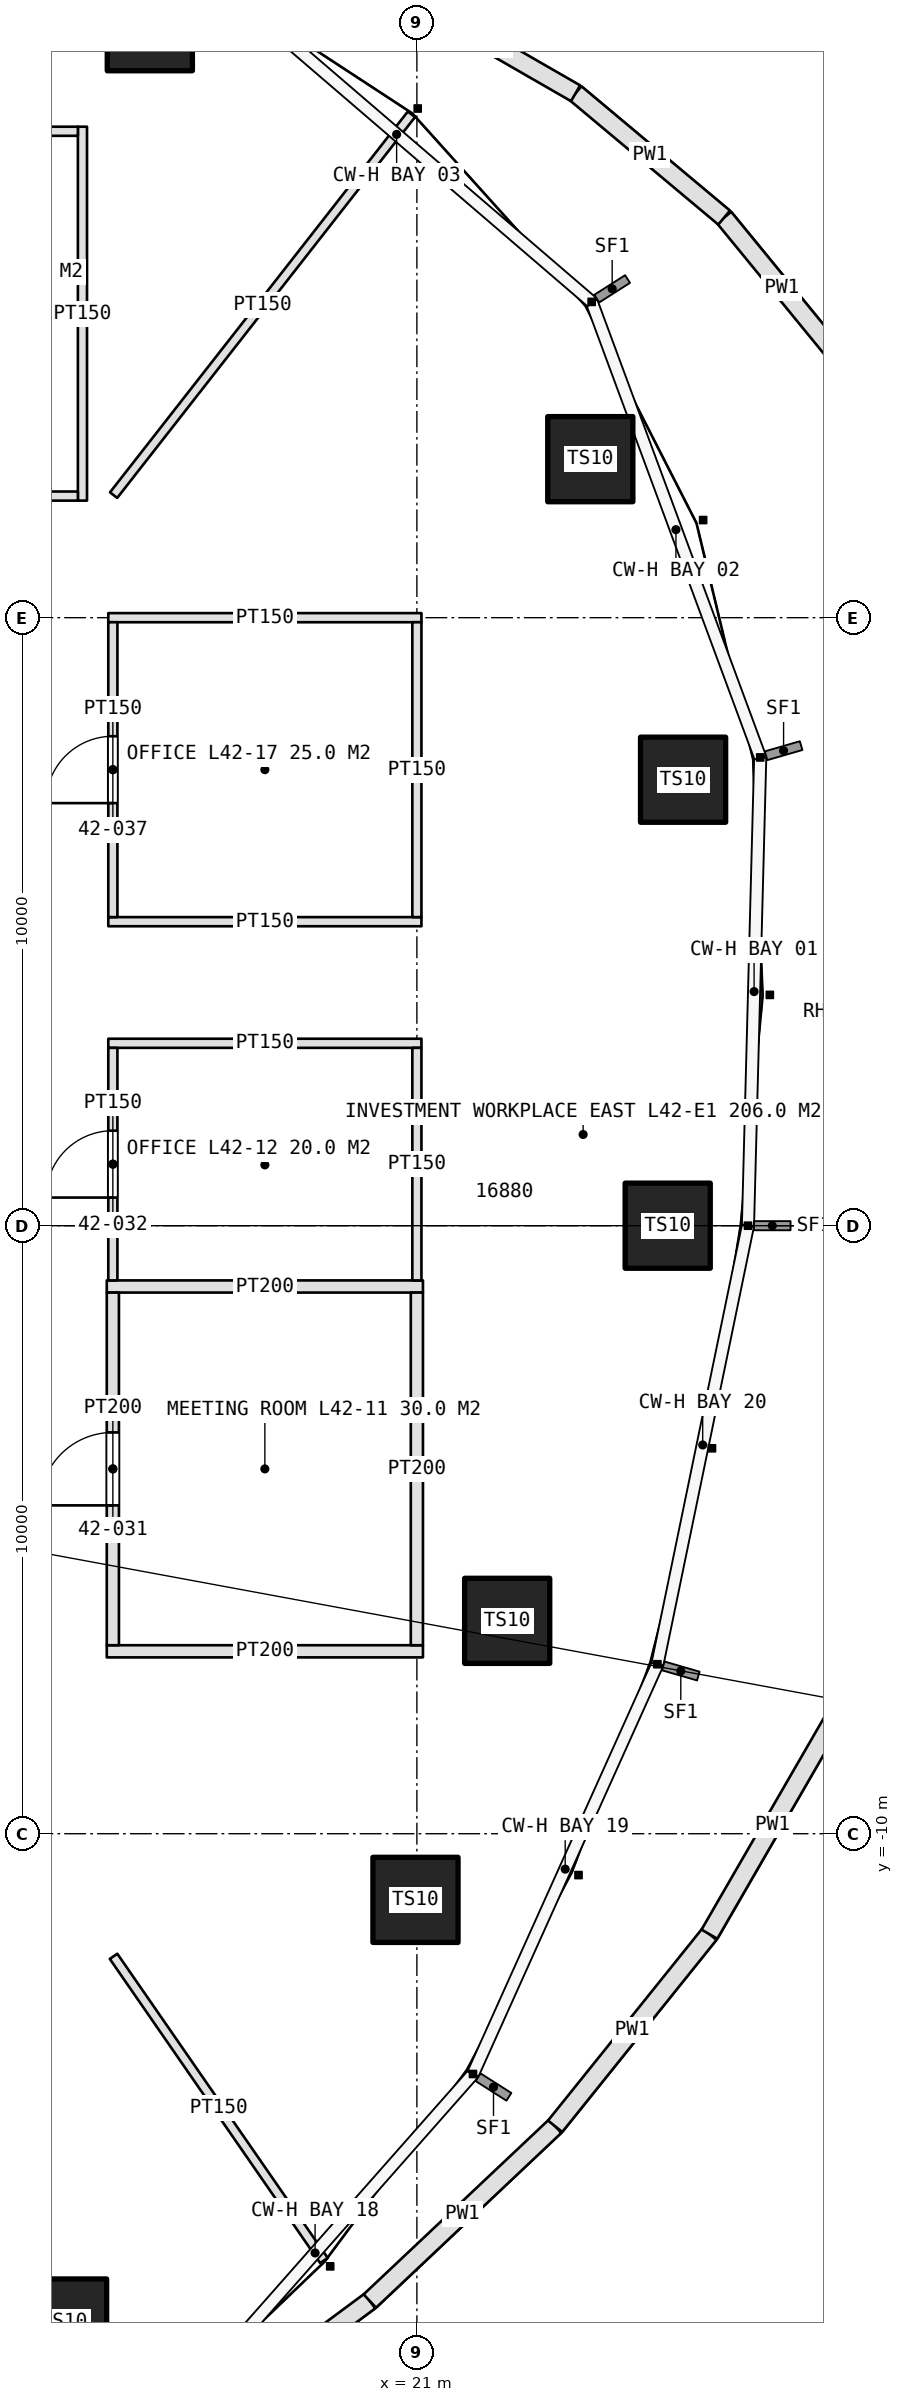
"""IFC4 building model, lengths in metres.
Left out: names, types, materials, properties, quantities, classifications, styles, units other than length and angle.
Written with IfcOpenShell. Run it as: python <this file> out.ifc"""

import sys

from ifc_helpers import new_model, si_unit, direction, frame, frame_2d, origin, origin_2d, place, context, subcontext, project, spatial, rectangle, hollow_rectangle, extrude, element, fill, save


model = new_model("IFC4")
c1 = context("Model", 3, precision=1e-05, world=origin(), true_north=direction((0.0, 1.0)))
c2 = subcontext(c1, "Body", "Model", "MODEL_VIEW")
j1 = project(units=[si_unit("LENGTHUNIT", "METRE"), si_unit("PLANEANGLEUNIT", "RADIAN")], contexts=[c1])
p1 = place(None, origin())
s1 = spatial("IfcSite", under=j1, at=p1, CompositionType="ELEMENT")
p2 = place(p1, origin())
s2 = spatial("IfcBuilding", under=s1, at=p2, CompositionType="ELEMENT")
p3 = place(p2, frame((0.0, 0.0, 194.8)))
s3 = spatial("IfcBuildingStorey", under=s2, at=p3, CompositionType="ELEMENT", Elevation=194.8)
for number, where, z_axis, x_axis in (
    (1, (25.125, 0.0, 0.775), (0.0, 0.0, 1.0), (1.0, 0.0, 0.0)),
    (2, (25.378, 7.335, 0.775), (0.0, 0.0, 1.0), (1.0, 0.0, 0.0)),
    (3, (23.852, 12.607, 0.775), (0.0, 0.0, 1.0), (1.0, 0.0, 0.0)),
):
    element("IfcColumn", number, at=place(p3, frame(where, z_axis=z_axis, x_axis=x_axis)), inside=s3, PredefinedType="COLUMN", context=c2, shape_type="SweptSolid", body=[
        extrude(hollow_rectangle(XDim=1.4, YDim=1.4, WallThickness=0.15, at=origin_2d()), origin(), (0.0, 0.0, 1.0), 3.425),
    ])
for number, where, z_axis, x_axis in (
    (4, (16.608, 19.695, 0.0), (0.0, 0.0, 1.0), (1.0, 0.0, 0.0)),
    (5, (15.198, -18.023, 0.0), (0.0, 0.0, 1.0), (1.0, 0.0, 0.0)),
):
    element("IfcColumn", number, at=place(p3, frame(where, z_axis=z_axis, x_axis=x_axis)), inside=s3, PredefinedType="COLUMN", context=c2, shape_type="SweptSolid", body=[
        extrude(hollow_rectangle(XDim=1.4, YDim=1.4, WallThickness=0.15, at=origin_2d()), origin(), (0.0, 0.0, 1.0), 4.2),
    ])
for number, where, z_axis, x_axis in (
    (6, (20.977, -11.088, 0.775), (0.0, 0.0, 1.0), (1.0, 0.0, 0.0)),
    (7, (22.485, -6.499, 0.775), (0.0, 0.0, 1.0), (1.0, 0.0, 0.0)),
):
    element("IfcColumn", number, at=place(p3, frame(where, z_axis=z_axis, x_axis=x_axis)), inside=s3, PredefinedType="COLUMN", context=c2, shape_type="SweptSolid", body=[
        extrude(hollow_rectangle(XDim=1.4, YDim=1.4, WallThickness=0.15, at=origin_2d()), origin(), (0.0, 0.0, 1.0), 3.425),
    ])
p4 = place(p3, frame((27.955, 14.258, 0.0), z_axis=(0.0, 0.0, 1.0), x_axis=(-0.633569858722, 0.773685487856, 0.0)))
e8 = element("IfcWall", 8, at=p4, inside=s3, PredefinedType="PARAPET", context=c2, shape_type="SweptSolid", body=[
    extrude(rectangle(XDim=3.002, YDim=0.3, at=frame_2d((1.501, 0.0))), origin(), (0.0, 0.0, 1.0), 1.1),
])
p5 = place(p3, frame((26.053, 16.58, 0.0), z_axis=(0.0, 0.0, 1.0), x_axis=(-0.766869065987, 0.641803580258, 0.0)))
e9 = element("IfcWall", 9, at=p5, inside=s3, PredefinedType="PARAPET", context=c2, shape_type="SweptSolid", body=[
    extrude(rectangle(XDim=3.186, YDim=0.3, at=frame_2d((1.593, 0.0))), origin(), (0.0, 0.0, 1.0), 1.1),
])
p6 = place(p3, frame((23.61, 18.625, 0.0), z_axis=(0.0, 0.0, 1.0), x_axis=(-0.866607267142, 0.498990826105, 0.0)))
e10 = element("IfcWall", 10, at=p6, inside=s3, PredefinedType="PARAPET", context=c2, shape_type="SweptSolid", body=[
    extrude(rectangle(XDim=3.159, YDim=0.3, at=frame_2d((1.58, 0.0))), origin(), (0.0, 0.0, 1.0), 1.1),
])
p7 = place(p3, frame((16.958, -20.11, 0.0), z_axis=(0.0, 0.0, 1.0), x_axis=(0.803271187039, 0.595613465322, 0.0)))
e11 = element("IfcWall", 11, at=p7, inside=s3, PredefinedType="PARAPET", context=c2, shape_type="SweptSolid", body=[
    extrude(rectangle(XDim=4.069, YDim=0.3, at=frame_2d((2.035, 0.0))), origin(), (0.0, 0.0, 1.0), 1.1),
])
p8 = place(p3, frame((20.226, -17.686, 0.0), z_axis=(0.0, 0.0, 1.0), x_axis=(0.727436462823, 0.686175045127, 0.0)))
e12 = element("IfcWall", 12, at=p8, inside=s3, PredefinedType="PARAPET", context=c2, shape_type="SweptSolid", body=[
    extrude(rectangle(XDim=4.189, YDim=0.3, at=frame_2d((2.095, 0.0))), origin(), (0.0, 0.0, 1.0), 1.1),
])
p9 = place(p3, frame((23.274, -14.812, 0.0), z_axis=(0.0, 0.0, 1.0), x_axis=(0.626200188056, 0.779662314389, 0.0)))
e13 = element("IfcWall", 13, at=p9, inside=s3, PredefinedType="PARAPET", context=c2, shape_type="SweptSolid", body=[
    extrude(rectangle(XDim=4.052, YDim=0.3, at=frame_2d((2.026, 0.0))), origin(), (0.0, 0.0, 1.0), 1.1),
])
p10 = place(p3, frame((25.811, -11.652, 0.0), z_axis=(0.0, 0.0, 1.0), x_axis=(0.500391312402, 0.865799361557, 0.0)))
e14 = element("IfcWall", 14, at=p10, inside=s3, PredefinedType="PARAPET", context=c2, shape_type="SweptSolid", body=[
    extrude(rectangle(XDim=4.149, YDim=0.3, at=frame_2d((2.075, 0.0))), origin(), (0.0, 0.0, 1.0), 1.1),
])
p11 = place(p3, frame((15.5, 11.925, 0.0), z_axis=(0.0, 0.0, 1.0), x_axis=(0.0, 1.0, 0.0)))
e15 = element("IfcWall", 15, at=p11, inside=s3, PredefinedType="PARTITIONING", context=c2, shape_type="SweptSolid", body=[
    extrude(rectangle(XDim=6.15, YDim=0.15, at=frame_2d((3.075, 0.0))), origin(), (0.0, 0.0, 1.0), 3.0),
])
p12 = place(p3, frame((11.6, 12.0, 0.0), z_axis=(0.0, 0.0, 1.0), x_axis=(1.0, 0.0, 0.0)))
e16 = element("IfcWall", 16, at=p12, inside=s3, PredefinedType="PARTITIONING", context=c2, shape_type="SweptSolid", body=[
    extrude(rectangle(XDim=3.825, YDim=0.15, at=frame_2d((1.913, 0.0))), origin(), (0.0, 0.0, 1.0), 3.0),
])
p13 = place(p12, frame((1.413, 0.0, 0.0)))
e17 = element("IfcOpeningElement", 17, at=p13, cuts=e16, PredefinedType="OPENING", context=c2, shape_type="SweptSolid", body=[
    extrude(rectangle(XDim=1.0, YDim=2.2, at=frame_2d((0.5, 1.1))), frame((0.0, 0.085, 0.0), z_axis=(0.0, -1.0, 0.0), x_axis=(1.0, 0.0, 0.0)), (0.0, 0.0, 1.0), 0.17),
])
p14 = place(p3, frame((11.6, 18.0, 0.0), z_axis=(0.0, 0.0, 1.0), x_axis=(1.0, 0.0, 0.0)))
e18 = element("IfcWall", 18, at=p14, inside=s3, PredefinedType="PARTITIONING", context=c2, shape_type="SweptSolid", body=[
    extrude(rectangle(XDim=3.825, YDim=0.15, at=frame_2d((1.913, 0.0))), origin(), (0.0, 0.0, 1.0), 3.0),
])
for number, where, z_axis, x_axis in (
    (19, (15.9, -7.0, 0.0), (0.0, 0.0, 1.0), (1.0, 0.0, 0.0)),
    (20, (15.9, -1.0, 0.0), (0.0, 0.0, 1.0), (1.0, 0.0, 0.0)),
):
    element("IfcWall", number, at=place(p3, frame(where, z_axis=z_axis, x_axis=x_axis)), inside=s3, PredefinedType="PARTITIONING", context=c2, shape_type="SweptSolid", body=[
        extrude(rectangle(XDim=5.2, YDim=0.2, at=frame_2d((2.6, 0.0))), origin(), (0.0, 0.0, 1.0), 3.0),
    ])
p15 = place(p3, frame((15.925, 3.0, 0.0), z_axis=(0.0, 0.0, 1.0), x_axis=(1.0, 0.0, 0.0)))
e21 = element("IfcWall", 21, at=p15, inside=s3, PredefinedType="PARTITIONING", context=c2, shape_type="SweptSolid", body=[
    extrude(rectangle(XDim=5.15, YDim=0.15, at=frame_2d((2.575, 0.0))), origin(), (0.0, 0.0, 1.0), 3.0),
])
p16 = place(p3, frame((16.0, -6.9, 0.0), z_axis=(0.0, 0.0, 1.0), x_axis=(0.0, 1.0, 0.0)))
e22 = element("IfcWall", 22, at=p16, inside=s3, PredefinedType="PARTITIONING", context=c2, shape_type="SweptSolid", body=[
    extrude(rectangle(XDim=5.8, YDim=0.2, at=frame_2d((2.9, 0.0))), origin(), (0.0, 0.0, 1.0), 3.0),
])
p17 = place(p16, frame((2.3, 0.0, 0.0)))
e23 = element("IfcOpeningElement", 23, at=p17, cuts=e22, PredefinedType="OPENING", context=c2, shape_type="SweptSolid", body=[
    extrude(rectangle(XDim=1.2, YDim=2.4, at=frame_2d((0.6, 1.2))), frame((0.0, 0.11, 0.0), z_axis=(0.0, -1.0, 0.0), x_axis=(1.0, 0.0, 0.0)), (0.0, 0.0, 1.0), 0.22),
])
p18 = place(p3, frame((21.0, -6.9, 0.0), z_axis=(0.0, 0.0, 1.0), x_axis=(0.0, 1.0, 0.0)))
e24 = element("IfcWall", 24, at=p18, inside=s3, PredefinedType="PARTITIONING", context=c2, shape_type="SweptSolid", body=[
    extrude(rectangle(XDim=5.8, YDim=0.2, at=frame_2d((2.9, 0.0))), origin(), (0.0, 0.0, 1.0), 3.0),
])
p19 = place(p3, frame((16.0, -0.9, 0.0), z_axis=(0.0, 0.0, 1.0), x_axis=(0.0, 1.0, 0.0)))
e25 = element("IfcWall", 25, at=p19, inside=s3, PredefinedType="PARTITIONING", context=c2, shape_type="SweptSolid", body=[
    extrude(rectangle(XDim=3.825, YDim=0.15, at=frame_2d((1.913, 0.0))), origin(), (0.0, 0.0, 1.0), 3.0),
])
p20 = place(p19, frame((1.363, 0.0, 0.0)))
e26 = element("IfcOpeningElement", 26, at=p20, cuts=e25, PredefinedType="OPENING", context=c2, shape_type="SweptSolid", body=[
    extrude(rectangle(XDim=1.1, YDim=2.3, at=frame_2d((0.55, 1.15))), frame((0.0, 0.085, 0.0), z_axis=(0.0, -1.0, 0.0), x_axis=(1.0, 0.0, 0.0)), (0.0, 0.0, 1.0), 0.17),
])
p21 = place(p3, frame((21.0, -0.9, 0.0), z_axis=(0.0, 0.0, 1.0), x_axis=(0.0, 1.0, 0.0)))
e27 = element("IfcWall", 27, at=p21, inside=s3, PredefinedType="PARTITIONING", context=c2, shape_type="SweptSolid", body=[
    extrude(rectangle(XDim=3.825, YDim=0.15, at=frame_2d((1.913, 0.0))), origin(), (0.0, 0.0, 1.0), 3.0),
])
for number, where, z_axis, x_axis in (
    (28, (15.925, 5.0, 0.0), (0.0, 0.0, 1.0), (1.0, 0.0, 0.0)),
    (29, (15.925, 10.0, 0.0), (0.0, 0.0, 1.0), (1.0, 0.0, 0.0)),
):
    element("IfcWall", number, at=place(p3, frame(where, z_axis=z_axis, x_axis=x_axis)), inside=s3, PredefinedType="PARTITIONING", context=c2, shape_type="SweptSolid", body=[
        extrude(rectangle(XDim=5.15, YDim=0.15, at=frame_2d((2.575, 0.0))), origin(), (0.0, 0.0, 1.0), 3.0),
    ])
p22 = place(p3, frame((16.0, 5.075, 0.0), z_axis=(0.0, 0.0, 1.0), x_axis=(0.0, 1.0, 0.0)))
e30 = element("IfcWall", 30, at=p22, inside=s3, PredefinedType="PARTITIONING", context=c2, shape_type="SweptSolid", body=[
    extrude(rectangle(XDim=4.85, YDim=0.15, at=frame_2d((2.425, 0.0))), origin(), (0.0, 0.0, 1.0), 3.0),
])
p23 = place(p22, frame((1.875, 0.0, 0.0)))
e31 = element("IfcOpeningElement", 31, at=p23, cuts=e30, PredefinedType="OPENING", context=c2, shape_type="SweptSolid", body=[
    extrude(rectangle(XDim=1.1, YDim=2.3, at=frame_2d((0.55, 1.15))), frame((0.0, 0.085, 0.0), z_axis=(0.0, -1.0, 0.0), x_axis=(1.0, 0.0, 0.0)), (0.0, 0.0, 1.0), 0.17),
])
p24 = place(p3, frame((21.0, 5.075, 0.0), z_axis=(0.0, 0.0, 1.0), x_axis=(0.0, 1.0, 0.0)))
e32 = element("IfcWall", 32, at=p24, inside=s3, PredefinedType="PARTITIONING", context=c2, shape_type="SweptSolid", body=[
    extrude(rectangle(XDim=4.85, YDim=0.15, at=frame_2d((2.425, 0.0))), origin(), (0.0, 0.0, 1.0), 3.0),
])
p25 = place(p3, frame((16.011, -12.016, 0.0), z_axis=(0.0, 0.0, 1.0), x_axis=(0.568863489071, -0.822431961199, 0.0)))
e33 = element("IfcWall", 33, at=p25, inside=s3, PredefinedType="PARTITIONING", context=c2, shape_type="SweptSolid", body=[
    extrude(rectangle(XDim=6.083, YDim=0.15, at=frame_2d((3.042, 0.0))), origin(), (0.0, 0.0, 1.0), 3.0),
])
p26 = place(p3, frame((16.012, 12.016, 0.0), z_axis=(0.0, 0.0, 1.0), x_axis=(0.616030058222, 0.787722646219, 0.0)))
e34 = element("IfcWall", 34, at=p26, inside=s3, PredefinedType="PARTITIONING", context=c2, shape_type="SweptSolid", body=[
    extrude(rectangle(XDim=7.952, YDim=0.15, at=frame_2d((3.976, 0.0))), origin(), (0.0, 0.0, 1.0), 3.0),
])
p27 = place(p17, origin())
e35 = element("IfcDoor", 35, at=p27, inside=s3, OperationType="SINGLE_SWING_LEFT", PredefinedType="DOOR", context=c2, shape_type="SweptSolid", body=[
    extrude(rectangle(XDim=1.2, YDim=2.4, at=frame_2d((0.6, 1.2))), frame((0.0, 0.025, 0.0), z_axis=(0.0, -1.0, 0.0), x_axis=(1.0, 0.0, 0.0)), (0.0, 0.0, 1.0), 0.05),
])
fill(e23, e35)
p28 = place(p20, origin())
e36 = element("IfcDoor", 36, at=p28, inside=s3, OperationType="SINGLE_SWING_LEFT", PredefinedType="DOOR", context=c2, shape_type="SweptSolid", body=[
    extrude(rectangle(XDim=1.1, YDim=2.3, at=frame_2d((0.55, 1.15))), frame((0.0, 0.025, 0.0), z_axis=(0.0, -1.0, 0.0), x_axis=(1.0, 0.0, 0.0)), (0.0, 0.0, 1.0), 0.05),
])
fill(e26, e36)
p29 = place(p23, origin())
e37 = element("IfcDoor", 37, at=p29, inside=s3, OperationType="SINGLE_SWING_LEFT", PredefinedType="DOOR", context=c2, shape_type="SweptSolid", body=[
    extrude(rectangle(XDim=1.1, YDim=2.3, at=frame_2d((0.55, 1.15))), frame((0.0, 0.025, 0.0), z_axis=(0.0, -1.0, 0.0), x_axis=(1.0, 0.0, 0.0)), (0.0, 0.0, 1.0), 0.05),
])
fill(e31, e37)
save(model, sys.argv[1])
